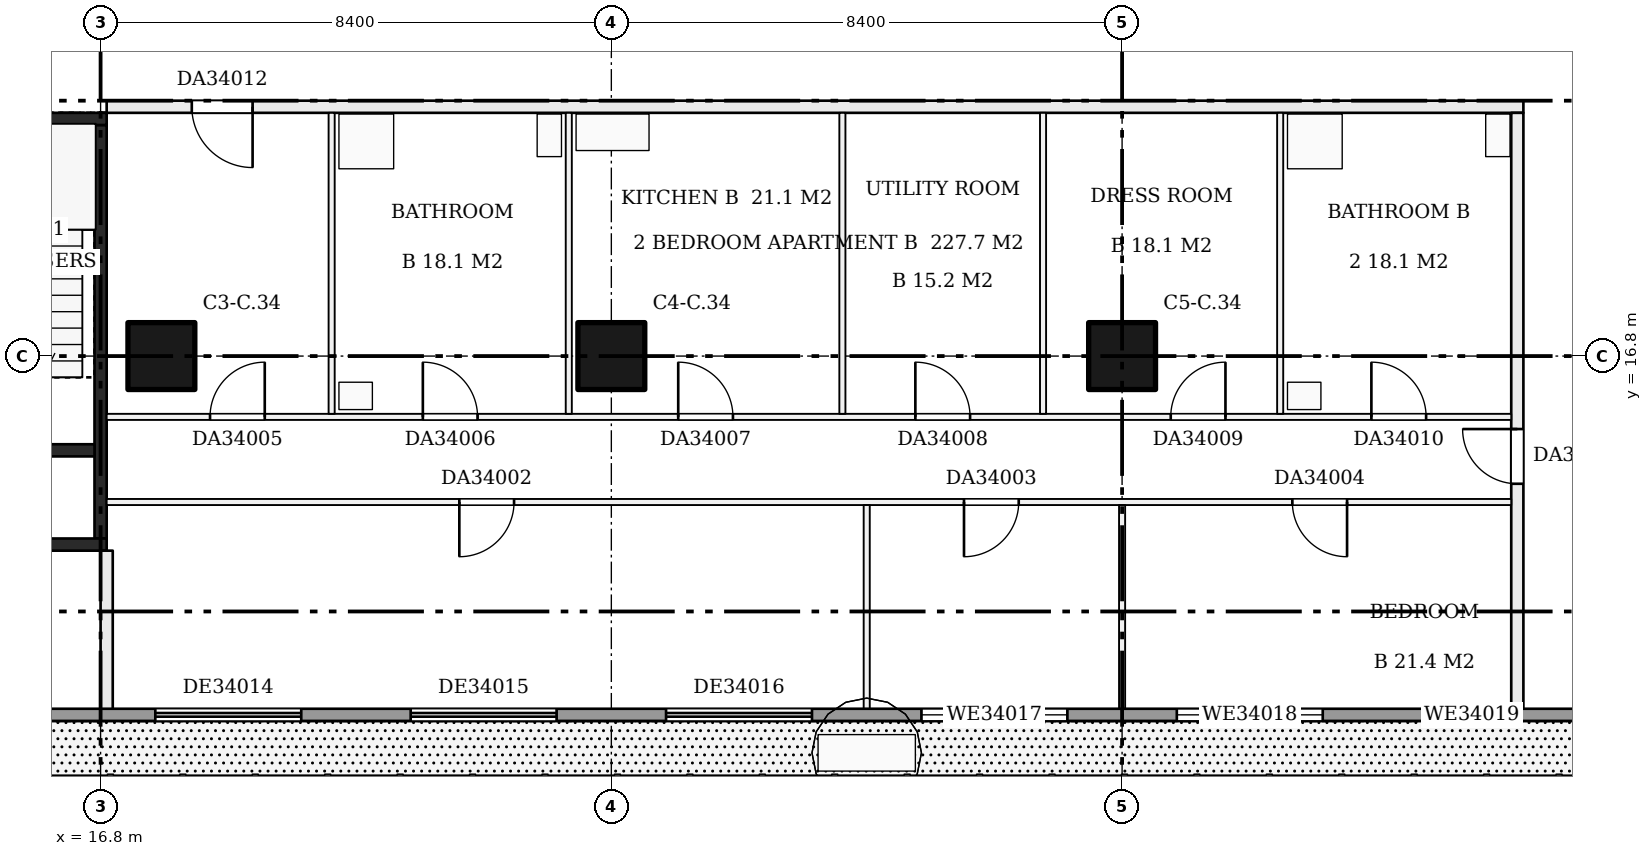
"""IFC4 building model, lengths in metres.
Left out: names, types, materials, properties, quantities, classifications, styles, units other than length and angle.
Written with IfcOpenShell. Run it as: python <this file> out.ifc"""

import sys

from ifc_helpers import new_model, si_unit, direction, frame, frame_2d, origin, origin_2d, place, context, subcontext, project, spatial, rectangle, extrude, element, fill, save


model = new_model("IFC4")
c1 = context("Model", 3, precision=1e-05, world=origin(), true_north=direction((0.0, 1.0)))
c2 = subcontext(c1, "Body", "Model", "MODEL_VIEW")
j1 = project(units=[si_unit("LENGTHUNIT", "METRE"), si_unit("PLANEANGLEUNIT", "RADIAN")], contexts=[c1])
p1 = place(None, origin())
s1 = spatial("IfcSite", under=j1, at=p1, CompositionType="ELEMENT")
p2 = place(p1, origin())
s2 = spatial("IfcBuilding", under=s1, at=p2, CompositionType="ELEMENT")
p3 = place(p2, frame((0.0, 0.0, 133.7)))
s3 = spatial("IfcBuildingStorey", under=s2, at=p3, CompositionType="ELEMENT", Elevation=133.7)
for number, where, z_axis, x_axis in (
    (1, (17.8, 16.8, 0.0), (0.0, 0.0, 1.0), (1.0, 0.0, 0.0)),
    (2, (25.2, 16.8, 0.0), (0.0, 0.0, 1.0), (1.0, 0.0, 0.0)),
    (3, (33.6, 16.8, 0.0), (0.0, 0.0, 1.0), (1.0, 0.0, 0.0)),
):
    element("IfcColumn", number, at=place(p3, frame(where, z_axis=z_axis, x_axis=x_axis)), inside=s3, PredefinedType="COLUMN", context=c2, shape_type="SweptSolid", body=[
        extrude(rectangle(XDim=1.1, YDim=1.1, at=origin_2d()), origin(), (0.0, 0.0, 1.0), 3.22),
    ])
p4 = place(p3, frame((16.8, 13.8, 0.0), z_axis=(0.0, 0.0, 1.0), x_axis=(0.0, 1.0, 0.0)))
e4 = element("IfcWall", 4, at=p4, inside=s3, PredefinedType="SHEAR", context=c2, shape_type="SweptSolid", body=[
    extrude(rectangle(XDim=6.8, YDim=0.2, at=frame_2d((3.4, 0.0))), origin(), (0.0, 0.0, 1.0), 3.22),
])
for number, where, z_axis, x_axis in (
    (5, (13.5, 13.7, 0.0), (0.0, 0.0, 1.0), (1.0, 0.0, 0.0)),
    (6, (13.5, 20.7, 0.0), (0.0, 0.0, 1.0), (1.0, 0.0, 0.0)),
):
    element("IfcWall", number, at=place(p3, frame(where, z_axis=z_axis, x_axis=x_axis)), inside=s3, PredefinedType="SHEAR", context=c2, shape_type="SweptSolid", body=[
        extrude(rectangle(XDim=3.4, YDim=0.2, at=frame_2d((1.7, 0.0))), origin(), (0.0, 0.0, 1.0), 3.22),
    ])
p5 = place(p3, frame((13.7, 15.25, 0.0), z_axis=(0.0, 0.0, 1.0), x_axis=(1.0, 0.0, 0.0)))
e7 = element("IfcWall", 7, at=p5, inside=s3, PredefinedType="SHEAR", context=c2, shape_type="SweptSolid", body=[
    extrude(rectangle(XDim=3.0, YDim=0.2, at=frame_2d((1.5, 0.0))), origin(), (0.0, 0.0, 1.0), 3.22),
])
p6 = place(p5, frame((1.0, 0.0, 0.0)))
e8 = element("IfcOpeningElement", 8, at=p6, cuts=e7, PredefinedType="OPENING", context=c2, shape_type="SweptSolid", body=[
    extrude(rectangle(XDim=1.0, YDim=2.1, at=frame_2d((0.5, 1.05))), frame((0.0, 0.11, 0.0), z_axis=(0.0, -1.0, 0.0), x_axis=(1.0, 0.0, 0.0)), (0.0, 0.0, 1.0), 0.22),
])
p7 = place(p3, frame((16.9, 14.4, 0.0), z_axis=(0.0, 0.0, 1.0), x_axis=(1.0, 0.0, 0.0)))
e9 = element("IfcWall", 9, at=p7, inside=s3, PredefinedType="PARTITIONING", context=c2, shape_type="SweptSolid", body=[
    extrude(rectangle(XDim=23.1, YDim=0.1, at=frame_2d((11.55, 0.0))), origin(), (0.0, 0.0, 1.0), 3.22),
])
p8 = place(p7, frame((5.8, 0.0, 0.0)))
e10 = element("IfcOpeningElement", 10, at=p8, cuts=e9, PredefinedType="OPENING", context=c2, shape_type="SweptSolid", body=[
    extrude(rectangle(XDim=0.9, YDim=2.1, at=frame_2d((0.45, 1.05))), frame((0.0, 0.06, 0.0), z_axis=(0.0, -1.0, 0.0), x_axis=(1.0, 0.0, 0.0)), (0.0, 0.0, 1.0), 0.12),
])
p9 = place(p7, frame((14.1, 0.0, 0.0)))
e11 = element("IfcOpeningElement", 11, at=p9, cuts=e9, PredefinedType="OPENING", context=c2, shape_type="SweptSolid", body=[
    extrude(rectangle(XDim=0.9, YDim=2.1, at=frame_2d((0.45, 1.05))), frame((0.0, 0.06, 0.0), z_axis=(0.0, -1.0, 0.0), x_axis=(1.0, 0.0, 0.0)), (0.0, 0.0, 1.0), 0.12),
])
p10 = place(p7, frame((19.5, 0.0, 0.0)))
e12 = element("IfcOpeningElement", 12, at=p10, cuts=e9, PredefinedType="OPENING", context=c2, shape_type="SweptSolid", body=[
    extrude(rectangle(XDim=0.9, YDim=2.1, at=frame_2d((0.45, 1.05))), frame((0.0, 0.06, 0.0), z_axis=(0.0, -1.0, 0.0), x_axis=(1.0, 0.0, 0.0)), (0.0, 0.0, 1.0), 0.12),
])
p11 = place(p3, frame((16.9, 15.8, 0.0), z_axis=(0.0, 0.0, 1.0), x_axis=(1.0, 0.0, 0.0)))
e13 = element("IfcWall", 13, at=p11, inside=s3, PredefinedType="PARTITIONING", context=c2, shape_type="SweptSolid", body=[
    extrude(rectangle(XDim=23.1, YDim=0.1, at=frame_2d((11.55, 0.0))), origin(), (0.0, 0.0, 1.0), 3.22),
])
p12 = place(p11, frame((1.7, 0.0, 0.0)))
e14 = element("IfcOpeningElement", 14, at=p12, cuts=e13, PredefinedType="OPENING", context=c2, shape_type="SweptSolid", body=[
    extrude(rectangle(XDim=0.9, YDim=2.1, at=frame_2d((0.45, 1.05))), frame((0.0, 0.06, 0.0), z_axis=(0.0, -1.0, 0.0), x_axis=(1.0, 0.0, 0.0)), (0.0, 0.0, 1.0), 0.12),
])
p13 = place(p11, frame((5.2, 0.0, 0.0)))
e15 = element("IfcOpeningElement", 15, at=p13, cuts=e13, PredefinedType="OPENING", context=c2, shape_type="SweptSolid", body=[
    extrude(rectangle(XDim=0.9, YDim=2.1, at=frame_2d((0.45, 1.05))), frame((0.0, 0.06, 0.0), z_axis=(0.0, -1.0, 0.0), x_axis=(1.0, 0.0, 0.0)), (0.0, 0.0, 1.0), 0.12),
])
p14 = place(p11, frame((9.4, 0.0, 0.0)))
e16 = element("IfcOpeningElement", 16, at=p14, cuts=e13, PredefinedType="OPENING", context=c2, shape_type="SweptSolid", body=[
    extrude(rectangle(XDim=0.9, YDim=2.1, at=frame_2d((0.45, 1.05))), frame((0.0, 0.06, 0.0), z_axis=(0.0, -1.0, 0.0), x_axis=(1.0, 0.0, 0.0)), (0.0, 0.0, 1.0), 0.12),
])
p15 = place(p11, frame((13.3, 0.0, 0.0)))
e17 = element("IfcOpeningElement", 17, at=p15, cuts=e13, PredefinedType="OPENING", context=c2, shape_type="SweptSolid", body=[
    extrude(rectangle(XDim=0.9, YDim=2.1, at=frame_2d((0.45, 1.05))), frame((0.0, 0.06, 0.0), z_axis=(0.0, -1.0, 0.0), x_axis=(1.0, 0.0, 0.0)), (0.0, 0.0, 1.0), 0.12),
])
p16 = place(p11, frame((17.5, 0.0, 0.0)))
e18 = element("IfcOpeningElement", 18, at=p16, cuts=e13, PredefinedType="OPENING", context=c2, shape_type="SweptSolid", body=[
    extrude(rectangle(XDim=0.9, YDim=2.1, at=frame_2d((0.45, 1.05))), frame((0.0, 0.06, 0.0), z_axis=(0.0, -1.0, 0.0), x_axis=(1.0, 0.0, 0.0)), (0.0, 0.0, 1.0), 0.12),
])
p17 = place(p11, frame((20.8, 0.0, 0.0)))
e19 = element("IfcOpeningElement", 19, at=p17, cuts=e13, PredefinedType="OPENING", context=c2, shape_type="SweptSolid", body=[
    extrude(rectangle(XDim=0.9, YDim=2.1, at=frame_2d((0.45, 1.05))), frame((0.0, 0.06, 0.0), z_axis=(0.0, -1.0, 0.0), x_axis=(1.0, 0.0, 0.0)), (0.0, 0.0, 1.0), 0.12),
])
p18 = place(p3, frame((16.9, 20.9, 0.0), z_axis=(0.0, 0.0, 1.0), x_axis=(1.0, 0.0, 0.0)))
e20 = element("IfcWall", 20, at=p18, inside=s3, PredefinedType="PARTITIONING", context=c2, shape_type="SweptSolid", body=[
    extrude(rectangle(XDim=23.3, YDim=0.2, at=frame_2d((11.65, 0.0))), origin(), (0.0, 0.0, 1.0), 3.22),
])
p19 = place(p18, frame((1.4, 0.0, 0.0)))
e21 = element("IfcOpeningElement", 21, at=p19, cuts=e20, PredefinedType="OPENING", context=c2, shape_type="SweptSolid", body=[
    extrude(rectangle(XDim=1.0, YDim=2.1, at=frame_2d((0.5, 1.05))), frame((0.0, 0.11, 0.0), z_axis=(0.0, -1.0, 0.0), x_axis=(1.0, 0.0, 0.0)), (0.0, 0.0, 1.0), 0.22),
])
p20 = place(p3, frame((16.9, 10.9, 0.0), z_axis=(0.0, 0.0, 1.0), x_axis=(0.0, 1.0, 0.0)))
e22 = element("IfcWall", 22, at=p20, inside=s3, PredefinedType="PARTITIONING", context=c2, shape_type="SweptSolid", body=[
    extrude(rectangle(XDim=2.7, YDim=0.2, at=frame_2d((1.35, 0.0))), origin(), (0.0, 0.0, 1.0), 3.22),
])
for number, where, z_axis, x_axis in (
    (23, (20.6, 15.85, 0.0), (0.0, 0.0, 1.0), (0.0, 1.0, 0.0)),
    (24, (24.5, 15.85, 0.0), (0.0, 0.0, 1.0), (0.0, 1.0, 0.0)),
    (25, (29.0, 15.85, 0.0), (0.0, 0.0, 1.0), (0.0, 1.0, 0.0)),
):
    element("IfcWall", number, at=place(p3, frame(where, z_axis=z_axis, x_axis=x_axis)), inside=s3, PredefinedType="PARTITIONING", context=c2, shape_type="SweptSolid", body=[
        extrude(rectangle(XDim=4.95, YDim=0.1, at=frame_2d((2.475, 0.0))), origin(), (0.0, 0.0, 1.0), 3.22),
    ])
p21 = place(p3, frame((29.4, 10.9, 0.0), z_axis=(0.0, 0.0, 1.0), x_axis=(0.0, 1.0, 0.0)))
e26 = element("IfcWall", 26, at=p21, inside=s3, PredefinedType="PARTITIONING", context=c2, shape_type="SweptSolid", body=[
    extrude(rectangle(XDim=3.45, YDim=0.1, at=frame_2d((1.725, 0.0))), origin(), (0.0, 0.0, 1.0), 3.22),
])
p22 = place(p3, frame((32.3, 15.85, 0.0), z_axis=(0.0, 0.0, 1.0), x_axis=(0.0, 1.0, 0.0)))
e27 = element("IfcWall", 27, at=p22, inside=s3, PredefinedType="PARTITIONING", context=c2, shape_type="SweptSolid", body=[
    extrude(rectangle(XDim=4.95, YDim=0.1, at=frame_2d((2.475, 0.0))), origin(), (0.0, 0.0, 1.0), 3.22),
])
p23 = place(p3, frame((33.6, 10.9, 0.0), z_axis=(0.0, 0.0, 1.0), x_axis=(0.0, 1.0, 0.0)))
e28 = element("IfcWall", 28, at=p23, inside=s3, PredefinedType="PARTITIONING", context=c2, shape_type="SweptSolid", body=[
    extrude(rectangle(XDim=3.45, YDim=0.1, at=frame_2d((1.725, 0.0))), origin(), (0.0, 0.0, 1.0), 3.22),
])
p24 = place(p3, frame((36.2, 15.85, 0.0), z_axis=(0.0, 0.0, 1.0), x_axis=(0.0, 1.0, 0.0)))
e29 = element("IfcWall", 29, at=p24, inside=s3, PredefinedType="PARTITIONING", context=c2, shape_type="SweptSolid", body=[
    extrude(rectangle(XDim=4.95, YDim=0.1, at=frame_2d((2.475, 0.0))), origin(), (0.0, 0.0, 1.0), 3.22),
])
p25 = place(p3, frame((40.1, 10.9, 0.0), z_axis=(0.0, 0.0, 1.0), x_axis=(0.0, 1.0, 0.0)))
e30 = element("IfcWall", 30, at=p25, inside=s3, PredefinedType="PARTITIONING", context=c2, shape_type="SweptSolid", body=[
    extrude(rectangle(XDim=9.9, YDim=0.2, at=frame_2d((4.95, 0.0))), origin(), (0.0, 0.0, 1.0), 3.22),
])
p26 = place(p25, frame((3.8, 0.0, 0.0)))
e31 = element("IfcOpeningElement", 31, at=p26, cuts=e30, PredefinedType="OPENING", context=c2, shape_type="SweptSolid", body=[
    extrude(rectangle(XDim=0.9, YDim=2.1, at=frame_2d((0.45, 1.05))), frame((0.0, 0.11, 0.0), z_axis=(0.0, -1.0, 0.0), x_axis=(1.0, 0.0, 0.0)), (0.0, 0.0, 1.0), 0.22),
])
p27 = place(p3, frame((4.8, 10.9, 0.0), z_axis=(0.0, 0.0, 1.0), x_axis=(1.0, 0.0, 0.0)))
e32 = element("IfcWall", 32, at=p27, inside=s3, PredefinedType="SOLIDWALL", context=c2, shape_type="SweptSolid", body=[
    extrude(rectangle(XDim=37.2, YDim=0.2, at=frame_2d((18.6, 0.0))), origin(), (0.0, 0.0, 1.0), 3.22),
])
p28 = place(p27, frame((0.3, 0.0, 0.9)))
e33 = element("IfcOpeningElement", 33, at=p28, cuts=e32, PredefinedType="OPENING", context=c2, shape_type="SweptSolid", body=[
    extrude(rectangle(XDim=2.4, YDim=1.5, at=frame_2d((1.2, 0.75))), frame((0.0, 0.11, 0.0), z_axis=(0.0, -1.0, 0.0), x_axis=(1.0, 0.0, 0.0)), (0.0, 0.0, 1.0), 0.22),
])
p29 = place(p27, frame((4.2, 0.0, 0.9)))
e34 = element("IfcOpeningElement", 34, at=p29, cuts=e32, PredefinedType="OPENING", context=c2, shape_type="SweptSolid", body=[
    extrude(rectangle(XDim=2.4, YDim=1.5, at=frame_2d((1.2, 0.75))), frame((0.0, 0.11, 0.0), z_axis=(0.0, -1.0, 0.0), x_axis=(1.0, 0.0, 0.0)), (0.0, 0.0, 1.0), 0.22),
])
p30 = place(p27, frame((12.9, 0.0, 0.0)))
e35 = element("IfcOpeningElement", 35, at=p30, cuts=e32, PredefinedType="OPENING", context=c2, shape_type="SweptSolid", body=[
    extrude(rectangle(XDim=2.4, YDim=2.2, at=frame_2d((1.2, 1.1))), frame((0.0, 0.11, 0.0), z_axis=(0.0, -1.0, 0.0), x_axis=(1.0, 0.0, 0.0)), (0.0, 0.0, 1.0), 0.22),
])
p31 = place(p27, frame((17.1, 0.0, 0.0)))
e36 = element("IfcOpeningElement", 36, at=p31, cuts=e32, PredefinedType="OPENING", context=c2, shape_type="SweptSolid", body=[
    extrude(rectangle(XDim=2.4, YDim=2.2, at=frame_2d((1.2, 1.1))), frame((0.0, 0.11, 0.0), z_axis=(0.0, -1.0, 0.0), x_axis=(1.0, 0.0, 0.0)), (0.0, 0.0, 1.0), 0.22),
])
p32 = place(p27, frame((21.3, 0.0, 0.0)))
e37 = element("IfcOpeningElement", 37, at=p32, cuts=e32, PredefinedType="OPENING", context=c2, shape_type="SweptSolid", body=[
    extrude(rectangle(XDim=2.4, YDim=2.2, at=frame_2d((1.2, 1.1))), frame((0.0, 0.11, 0.0), z_axis=(0.0, -1.0, 0.0), x_axis=(1.0, 0.0, 0.0)), (0.0, 0.0, 1.0), 0.22),
])
p33 = place(p27, frame((25.5, 0.0, 0.9)))
e38 = element("IfcOpeningElement", 38, at=p33, cuts=e32, PredefinedType="OPENING", context=c2, shape_type="SweptSolid", body=[
    extrude(rectangle(XDim=2.4, YDim=1.5, at=frame_2d((1.2, 0.75))), frame((0.0, 0.11, 0.0), z_axis=(0.0, -1.0, 0.0), x_axis=(1.0, 0.0, 0.0)), (0.0, 0.0, 1.0), 0.22),
])
p34 = place(p27, frame((29.7, 0.0, 0.9)))
e39 = element("IfcOpeningElement", 39, at=p34, cuts=e32, PredefinedType="OPENING", context=c2, shape_type="SweptSolid", body=[
    extrude(rectangle(XDim=2.4, YDim=1.5, at=frame_2d((1.2, 0.75))), frame((0.0, 0.11, 0.0), z_axis=(0.0, -1.0, 0.0), x_axis=(1.0, 0.0, 0.0)), (0.0, 0.0, 1.0), 0.22),
])
p35 = place(p27, frame((33.9, 0.0, 0.9)))
e40 = element("IfcOpeningElement", 40, at=p35, cuts=e32, PredefinedType="OPENING", context=c2, shape_type="SweptSolid", body=[
    extrude(rectangle(XDim=1.3, YDim=1.5, at=frame_2d((0.65, 0.75))), frame((0.0, 0.11, 0.0), z_axis=(0.0, -1.0, 0.0), x_axis=(1.0, 0.0, 0.0)), (0.0, 0.0, 1.0), 0.22),
])
p36 = place(p8, frame((0.9, 0.0, 0.0), z_axis=(0.0, 0.0, 1.0), x_axis=(-1.0, 0.0, 0.0)))
e41 = element("IfcDoor", 41, at=p36, inside=s3, OperationType="SINGLE_SWING_RIGHT", PredefinedType="DOOR", context=c2, shape_type="SweptSolid", body=[
    extrude(rectangle(XDim=0.9, YDim=2.1, at=frame_2d((0.45, 1.05))), frame((0.0, 0.025, 0.0), z_axis=(0.0, -1.0, 0.0), x_axis=(1.0, 0.0, 0.0)), (0.0, 0.0, 1.0), 0.05),
])
fill(e10, e41)
p37 = place(p9, frame((0.9, 0.0, 0.0), z_axis=(0.0, 0.0, 1.0), x_axis=(-1.0, 0.0, 0.0)))
e42 = element("IfcDoor", 42, at=p37, inside=s3, OperationType="SINGLE_SWING_RIGHT", PredefinedType="DOOR", context=c2, shape_type="SweptSolid", body=[
    extrude(rectangle(XDim=0.9, YDim=2.1, at=frame_2d((0.45, 1.05))), frame((0.0, 0.025, 0.0), z_axis=(0.0, -1.0, 0.0), x_axis=(1.0, 0.0, 0.0)), (0.0, 0.0, 1.0), 0.05),
])
fill(e11, e42)
p38 = place(p10, frame((0.9, 0.0, 0.0), z_axis=(0.0, 0.0, 1.0), x_axis=(-1.0, 0.0, 0.0)))
e43 = element("IfcDoor", 43, at=p38, inside=s3, OperationType="SINGLE_SWING_LEFT", PredefinedType="DOOR", context=c2, shape_type="SweptSolid", body=[
    extrude(rectangle(XDim=0.9, YDim=2.1, at=frame_2d((0.45, 1.05))), frame((0.0, 0.025, 0.0), z_axis=(0.0, -1.0, 0.0), x_axis=(1.0, 0.0, 0.0)), (0.0, 0.0, 1.0), 0.05),
])
fill(e12, e43)
p39 = place(p12, origin())
e44 = element("IfcDoor", 44, at=p39, inside=s3, OperationType="SINGLE_SWING_RIGHT", PredefinedType="DOOR", context=c2, shape_type="SweptSolid", body=[
    extrude(rectangle(XDim=0.9, YDim=2.1, at=frame_2d((0.45, 1.05))), frame((0.0, 0.025, 0.0), z_axis=(0.0, -1.0, 0.0), x_axis=(1.0, 0.0, 0.0)), (0.0, 0.0, 1.0), 0.05),
])
fill(e14, e44)
p40 = place(p13, origin())
e45 = element("IfcDoor", 45, at=p40, inside=s3, OperationType="SINGLE_SWING_LEFT", PredefinedType="DOOR", context=c2, shape_type="SweptSolid", body=[
    extrude(rectangle(XDim=0.9, YDim=2.1, at=frame_2d((0.45, 1.05))), frame((0.0, 0.025, 0.0), z_axis=(0.0, -1.0, 0.0), x_axis=(1.0, 0.0, 0.0)), (0.0, 0.0, 1.0), 0.05),
])
fill(e15, e45)
p41 = place(p14, origin())
e46 = element("IfcDoor", 46, at=p41, inside=s3, OperationType="SINGLE_SWING_LEFT", PredefinedType="DOOR", context=c2, shape_type="SweptSolid", body=[
    extrude(rectangle(XDim=0.9, YDim=2.1, at=frame_2d((0.45, 1.05))), frame((0.0, 0.025, 0.0), z_axis=(0.0, -1.0, 0.0), x_axis=(1.0, 0.0, 0.0)), (0.0, 0.0, 1.0), 0.05),
])
fill(e16, e46)
p42 = place(p15, origin())
e47 = element("IfcDoor", 47, at=p42, inside=s3, OperationType="SINGLE_SWING_LEFT", PredefinedType="DOOR", context=c2, shape_type="SweptSolid", body=[
    extrude(rectangle(XDim=0.9, YDim=2.1, at=frame_2d((0.45, 1.05))), frame((0.0, 0.025, 0.0), z_axis=(0.0, -1.0, 0.0), x_axis=(1.0, 0.0, 0.0)), (0.0, 0.0, 1.0), 0.05),
])
fill(e17, e47)
p43 = place(p16, origin())
e48 = element("IfcDoor", 48, at=p43, inside=s3, OperationType="SINGLE_SWING_RIGHT", PredefinedType="DOOR", context=c2, shape_type="SweptSolid", body=[
    extrude(rectangle(XDim=0.9, YDim=2.1, at=frame_2d((0.45, 1.05))), frame((0.0, 0.025, 0.0), z_axis=(0.0, -1.0, 0.0), x_axis=(1.0, 0.0, 0.0)), (0.0, 0.0, 1.0), 0.05),
])
fill(e18, e48)
p44 = place(p17, origin())
e49 = element("IfcDoor", 49, at=p44, inside=s3, OperationType="SINGLE_SWING_LEFT", PredefinedType="DOOR", context=c2, shape_type="SweptSolid", body=[
    extrude(rectangle(XDim=0.9, YDim=2.1, at=frame_2d((0.45, 1.05))), frame((0.0, 0.025, 0.0), z_axis=(0.0, -1.0, 0.0), x_axis=(1.0, 0.0, 0.0)), (0.0, 0.0, 1.0), 0.05),
])
fill(e19, e49)
p45 = place(p19, frame((1.0, 0.0, 0.0), z_axis=(0.0, 0.0, 1.0), x_axis=(-1.0, 0.0, 0.0)))
e50 = element("IfcDoor", 50, at=p45, inside=s3, OperationType="SINGLE_SWING_LEFT", PredefinedType="DOOR", context=c2, shape_type="SweptSolid", body=[
    extrude(rectangle(XDim=1.0, YDim=2.1, at=frame_2d((0.5, 1.05))), frame((0.0, 0.025, 0.0), z_axis=(0.0, -1.0, 0.0), x_axis=(1.0, 0.0, 0.0)), (0.0, 0.0, 1.0), 0.05),
])
fill(e21, e50)
p46 = place(p26, origin())
e51 = element("IfcDoor", 51, at=p46, inside=s3, OperationType="SINGLE_SWING_RIGHT", PredefinedType="DOOR", context=c2, shape_type="SweptSolid", body=[
    extrude(rectangle(XDim=0.9, YDim=2.1, at=frame_2d((0.45, 1.05))), frame((0.0, 0.025, 0.0), z_axis=(0.0, -1.0, 0.0), x_axis=(1.0, 0.0, 0.0)), (0.0, 0.0, 1.0), 0.05),
])
fill(e31, e51)
p47 = place(p30, origin())
e52 = element("IfcDoor", 52, at=p47, inside=s3, OperationType="DOUBLE_DOOR_SLIDING", PredefinedType="DOOR", context=c2, shape_type="SweptSolid", body=[
    extrude(rectangle(XDim=2.4, YDim=2.2, at=frame_2d((1.2, 1.1))), frame((0.0, 0.025, 0.0), z_axis=(0.0, -1.0, 0.0), x_axis=(1.0, 0.0, 0.0)), (0.0, 0.0, 1.0), 0.05),
])
fill(e35, e52)
p48 = place(p31, origin())
e53 = element("IfcDoor", 53, at=p48, inside=s3, OperationType="DOUBLE_DOOR_SLIDING", PredefinedType="DOOR", context=c2, shape_type="SweptSolid", body=[
    extrude(rectangle(XDim=2.4, YDim=2.2, at=frame_2d((1.2, 1.1))), frame((0.0, 0.025, 0.0), z_axis=(0.0, -1.0, 0.0), x_axis=(1.0, 0.0, 0.0)), (0.0, 0.0, 1.0), 0.05),
])
fill(e36, e53)
p49 = place(p32, origin())
e54 = element("IfcDoor", 54, at=p49, inside=s3, OperationType="DOUBLE_DOOR_SLIDING", PredefinedType="DOOR", context=c2, shape_type="SweptSolid", body=[
    extrude(rectangle(XDim=2.4, YDim=2.2, at=frame_2d((1.2, 1.1))), frame((0.0, 0.025, 0.0), z_axis=(0.0, -1.0, 0.0), x_axis=(1.0, 0.0, 0.0)), (0.0, 0.0, 1.0), 0.05),
])
fill(e37, e54)
p50 = place(p33, origin())
e55 = element("IfcWindow", 55, at=p50, inside=s3, PartitioningType="SINGLE_PANEL", PredefinedType="WINDOW", context=c2, shape_type="SweptSolid", body=[
    extrude(rectangle(XDim=2.4, YDim=1.5, at=frame_2d((1.2, 0.75))), frame((0.0, 0.03, 0.0), z_axis=(0.0, -1.0, 0.0), x_axis=(1.0, 0.0, 0.0)), (0.0, 0.0, 1.0), 0.06),
])
fill(e38, e55)
p51 = place(p34, origin())
e56 = element("IfcWindow", 56, at=p51, inside=s3, PartitioningType="SINGLE_PANEL", PredefinedType="WINDOW", context=c2, shape_type="SweptSolid", body=[
    extrude(rectangle(XDim=2.4, YDim=1.5, at=frame_2d((1.2, 0.75))), frame((0.0, 0.03, 0.0), z_axis=(0.0, -1.0, 0.0), x_axis=(1.0, 0.0, 0.0)), (0.0, 0.0, 1.0), 0.06),
])
fill(e39, e56)
p52 = place(p35, origin())
e57 = element("IfcWindow", 57, at=p52, inside=s3, PartitioningType="SINGLE_PANEL", PredefinedType="WINDOW", context=c2, shape_type="SweptSolid", body=[
    extrude(rectangle(XDim=1.3, YDim=1.5, at=frame_2d((0.65, 0.75))), frame((0.0, 0.03, 0.0), z_axis=(0.0, -1.0, 0.0), x_axis=(1.0, 0.0, 0.0)), (0.0, 0.0, 1.0), 0.06),
])
fill(e40, e57)
save(model, sys.argv[1])
